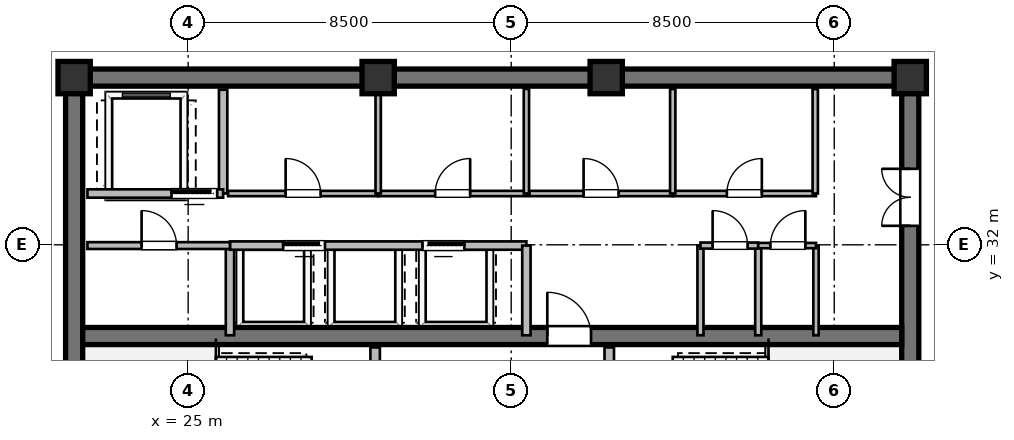
"""IFC4 building model, lengths in metres.
Left out: names, types, materials, properties, quantities, classifications, styles, units other than length and angle.
Written with IfcOpenShell. Run it as: python <this file> out.ifc"""

import sys

from ifc_helpers import new_model, si_unit, direction, frame, frame_2d, origin, origin_2d, place, context, subcontext, project, spatial, rectangle, extrude, element, fill, save


model = new_model("IFC4")
c1 = context("Model", 3, precision=1e-05, world=origin(), true_north=direction((0.0, 1.0)))
c2 = subcontext(c1, "Body", "Model", "MODEL_VIEW")
j1 = project(units=[si_unit("LENGTHUNIT", "METRE"), si_unit("PLANEANGLEUNIT", "RADIAN")], contexts=[c1])
p1 = place(None, origin())
s1 = spatial("IfcSite", under=j1, at=p1, CompositionType="ELEMENT")
p2 = place(p1, origin())
s2 = spatial("IfcBuilding", under=s1, at=p2, CompositionType="ELEMENT")
p3 = place(p2, frame((0.0, 0.0, 249.6)))
s3 = spatial("IfcBuildingStorey", under=s2, at=p3, CompositionType="ELEMENT", Elevation=249.6)
p4 = place(p3, frame((21.775, 36.4, 0.0), z_axis=(0.0, 0.0, 1.0), x_axis=(1.0, 0.0, 0.0)))
e1 = element("IfcWall", 1, at=p4, inside=s3, PredefinedType="SHEAR", context=c2, shape_type="SweptSolid", body=[
    extrude(rectangle(XDim=22.45, YDim=0.45, at=frame_2d((11.225, 0.0))), origin(), (0.0, 0.0, 1.0), 3.28),
])
p5 = place(p3, frame((22.0, 23.825, 0.0), z_axis=(0.0, 0.0, 1.0), x_axis=(0.0, 1.0, 0.0)))
e2 = element("IfcWall", 2, at=p5, inside=s3, PredefinedType="SHEAR", context=c2, shape_type="SweptSolid", body=[
    extrude(rectangle(XDim=12.35, YDim=0.45, at=frame_2d((6.175, 0.0))), origin(), (0.0, 0.0, 1.0), 3.28),
])
p6 = place(p3, frame((44.0, 23.825, 0.0), z_axis=(0.0, 0.0, 1.0), x_axis=(0.0, 1.0, 0.0)))
e3 = element("IfcWall", 3, at=p6, inside=s3, PredefinedType="SHEAR", context=c2, shape_type="SweptSolid", body=[
    extrude(rectangle(XDim=12.35, YDim=0.45, at=frame_2d((6.175, 0.0))), origin(), (0.0, 0.0, 1.0), 3.28),
])
p7 = place(p6, frame((8.675, 0.0, 0.0)))
e4 = element("IfcOpeningElement", 4, at=p7, cuts=e3, PredefinedType="OPENING", context=c2, shape_type="SweptSolid", body=[
    extrude(rectangle(XDim=1.5, YDim=2.15, at=frame_2d((0.75, 1.075))), frame((0.0, 0.235, 0.0), z_axis=(0.0, -1.0, 0.0), x_axis=(1.0, 0.0, 0.0)), (0.0, 0.0, 1.0), 0.47),
])
p8 = place(p3, frame((22.225, 29.6, 0.0), z_axis=(0.0, 0.0, 1.0), x_axis=(1.0, 0.0, 0.0)))
e5 = element("IfcWall", 5, at=p8, inside=s3, PredefinedType="SHEAR", context=c2, shape_type="SweptSolid", body=[
    extrude(rectangle(XDim=21.55, YDim=0.45, at=frame_2d((10.775, 0.0))), origin(), (0.0, 0.0, 1.0), 3.28),
])
p9 = place(p8, frame((12.225, 0.0, 0.0)))
e6 = element("IfcOpeningElement", 6, at=p9, cuts=e5, PredefinedType="OPENING", context=c2, shape_type="SweptSolid", body=[
    extrude(rectangle(XDim=1.15, YDim=2.1, at=frame_2d((0.575, 1.05))), frame((0.0, 0.235, 0.0), z_axis=(0.0, -1.0, 0.0), x_axis=(1.0, 0.0, 0.0)), (0.0, 0.0, 1.0), 0.47),
])
for number, where, z_axis, x_axis in (
    (7, (44.0, 36.4, 0.0), (0.0, 0.0, 1.0), (1.0, 0.0, 0.0)),
    (8, (36.0, 36.4, 0.0), (0.0, 0.0, 1.0), (1.0, 0.0, 0.0)),
    (9, (30.0, 36.4, 0.0), (0.0, 0.0, 1.0), (1.0, 0.0, 0.0)),
    (10, (22.0, 36.4, 0.0), (0.0, 0.0, 1.0), (1.0, 0.0, 0.0)),
):
    element("IfcColumn", number, at=place(p3, frame(where, z_axis=z_axis, x_axis=x_axis)), inside=s3, PredefinedType="COLUMN", context=c2, shape_type="SweptSolid", body=[
        extrude(rectangle(XDim=0.85, YDim=0.85, at=origin_2d()), origin(), (0.0, 0.0, 1.0), 3.6),
    ])
p10 = place(p3, frame((29.92, 23.9, 0.0), z_axis=(0.0, 0.0, 1.0), x_axis=(0.0, 1.0, 0.0)))
e11 = element("IfcWall", 11, at=p10, inside=s3, PredefinedType="SOLIDWALL", context=c2, shape_type="SweptSolid", body=[
    extrude(rectangle(XDim=5.4, YDim=0.25, at=frame_2d((2.7, 0.0))), origin(), (0.0, 0.0, 1.0), 3.28),
])
p11 = place(p10, frame((3.421, 0.0, 0.0)))
e12 = element("IfcOpeningElement", 12, at=p11, cuts=e11, PredefinedType="OPENING", context=c2, shape_type="SweptSolid", body=[
    extrude(rectangle(XDim=1.15, YDim=2.1, at=frame_2d((0.575, 1.05))), frame((0.0, 0.135, 0.0), z_axis=(0.0, -1.0, 0.0), x_axis=(1.0, 0.0, 0.0)), (0.0, 0.0, 1.0), 0.27),
])
p12 = place(p3, frame((36.08, 23.9, 0.0), z_axis=(0.0, 0.0, 1.0), x_axis=(0.0, 1.0, 0.0)))
e13 = element("IfcWall", 13, at=p12, inside=s3, PredefinedType="SOLIDWALL", context=c2, shape_type="SweptSolid", body=[
    extrude(rectangle(XDim=5.4, YDim=0.25, at=frame_2d((2.7, 0.0))), origin(), (0.0, 0.0, 1.0), 3.28),
])
p13 = place(p12, frame((3.421, 0.0, 0.0)))
e14 = element("IfcOpeningElement", 14, at=p13, cuts=e13, PredefinedType="OPENING", context=c2, shape_type="SweptSolid", body=[
    extrude(rectangle(XDim=1.15, YDim=2.1, at=frame_2d((0.575, 1.05))), frame((0.0, 0.135, 0.0), z_axis=(0.0, -1.0, 0.0), x_axis=(1.0, 0.0, 0.0)), (0.0, 0.0, 1.0), 0.27),
])
p14 = place(p3, frame((25.92, 33.35, 0.0), z_axis=(0.0, 0.0, 1.0), x_axis=(0.0, 1.0, 0.0)))
e15 = element("IfcWall", 15, at=p14, inside=s3, PredefinedType="SOLIDWALL", context=c2, shape_type="SweptSolid", body=[
    extrude(rectangle(XDim=2.73, YDim=0.22, at=frame_2d((1.365, 0.0))), origin(), (0.0, 0.0, 1.0), 3.28),
])
p15 = place(p3, frame((22.35, 33.35, 0.0), z_axis=(0.0, 0.0, 1.0), x_axis=(1.0, 0.0, 0.0)))
e16 = element("IfcWall", 16, at=p15, inside=s3, PredefinedType="SOLIDWALL", context=c2, shape_type="SweptSolid", body=[
    extrude(rectangle(XDim=3.57, YDim=0.22, at=frame_2d((1.785, 0.0))), origin(), (0.0, 0.0, 1.0), 3.28),
])
p16 = place(p15, frame((2.213, 0.0, 0.0)))
e17 = element("IfcOpeningElement", 17, at=p16, cuts=e16, PredefinedType="OPENING", context=c2, shape_type="SweptSolid", body=[
    extrude(rectangle(XDim=1.2, YDim=2.1, at=frame_2d((0.6, 1.05))), frame((0.0, 0.12, 0.0), z_axis=(0.0, -1.0, 0.0), x_axis=(1.0, 0.0, 0.0)), (0.0, 0.0, 1.0), 0.24),
])
p17 = place(p3, frame((26.1, 29.62, 0.0), z_axis=(0.0, 0.0, 1.0), x_axis=(0.0, 1.0, 0.0)))
e18 = element("IfcWall", 18, at=p17, inside=s3, PredefinedType="SOLIDWALL", context=c2, shape_type="SweptSolid", body=[
    extrude(rectangle(XDim=2.36, YDim=0.22, at=frame_2d((1.18, 0.0))), origin(), (0.0, 0.0, 1.0), 3.28),
])
p18 = place(p3, frame((26.1, 31.98, 0.0), z_axis=(0.0, 0.0, 1.0), x_axis=(1.0, 0.0, 0.0)))
e19 = element("IfcWall", 19, at=p18, inside=s3, PredefinedType="SOLIDWALL", context=c2, shape_type="SweptSolid", body=[
    extrude(rectangle(XDim=7.8, YDim=0.22, at=frame_2d((3.9, 0.0))), origin(), (0.0, 0.0, 1.0), 3.28),
])
p19 = place(p18, frame((1.4, 0.0, 0.0)))
e20 = element("IfcOpeningElement", 20, at=p19, cuts=e19, PredefinedType="OPENING", context=c2, shape_type="SweptSolid", body=[
    extrude(rectangle(XDim=1.1, YDim=2.1, at=frame_2d((0.55, 1.05))), frame((0.0, 0.12, 0.0), z_axis=(0.0, -1.0, 0.0), x_axis=(1.0, 0.0, 0.0)), (0.0, 0.0, 1.0), 0.24),
])
p20 = place(p18, frame((5.066, 0.0, 0.0)))
e21 = element("IfcOpeningElement", 21, at=p20, cuts=e19, PredefinedType="OPENING", context=c2, shape_type="SweptSolid", body=[
    extrude(rectangle(XDim=1.1, YDim=2.1, at=frame_2d((0.55, 1.05))), frame((0.0, 0.12, 0.0), z_axis=(0.0, -1.0, 0.0), x_axis=(1.0, 0.0, 0.0)), (0.0, 0.0, 1.0), 0.24),
])
p21 = place(p3, frame((33.9, 29.62, 0.0), z_axis=(0.0, 0.0, 1.0), x_axis=(0.0, 1.0, 0.0)))
e22 = element("IfcWall", 22, at=p21, inside=s3, PredefinedType="SOLIDWALL", context=c2, shape_type="SweptSolid", body=[
    extrude(rectangle(XDim=2.36, YDim=0.22, at=frame_2d((1.18, 0.0))), origin(), (0.0, 0.0, 1.0), 3.28),
])
p22 = place(p3, frame((26.05, 33.35, 0.0), z_axis=(0.0, 0.0, 1.0), x_axis=(1.0, 0.0, 0.0)))
e23 = element("IfcWall", 23, at=p22, inside=s3, PredefinedType="PARTITIONING", context=c2, shape_type="SweptSolid", body=[
    extrude(rectangle(XDim=3.95, YDim=0.14, at=frame_2d((1.975, 0.0))), origin(), (0.0, 0.0, 1.0), 3.28),
])
p23 = place(p22, frame((1.515, 0.0, 0.0)))
e24 = element("IfcOpeningElement", 24, at=p23, cuts=e23, PredefinedType="OPENING", context=c2, shape_type="SweptSolid", body=[
    extrude(rectangle(XDim=0.92, YDim=2.1, at=frame_2d((0.46, 1.05))), frame((0.0, 0.08, 0.0), z_axis=(0.0, -1.0, 0.0), x_axis=(1.0, 0.0, 0.0)), (0.0, 0.0, 1.0), 0.16),
])
p24 = place(p3, frame((30.0, 33.35, 0.0), z_axis=(0.0, 0.0, 1.0), x_axis=(1.0, 0.0, 0.0)))
e25 = element("IfcWall", 25, at=p24, inside=s3, PredefinedType="PARTITIONING", context=c2, shape_type="SweptSolid", body=[
    extrude(rectangle(XDim=3.92, YDim=0.14, at=frame_2d((1.96, 0.0))), origin(), (0.0, 0.0, 1.0), 3.28),
])
p25 = place(p24, frame((1.5, 0.0, 0.0)))
e26 = element("IfcOpeningElement", 26, at=p25, cuts=e25, PredefinedType="OPENING", context=c2, shape_type="SweptSolid", body=[
    extrude(rectangle(XDim=0.92, YDim=2.1, at=frame_2d((0.46, 1.05))), frame((0.0, 0.08, 0.0), z_axis=(0.0, -1.0, 0.0), x_axis=(1.0, 0.0, 0.0)), (0.0, 0.0, 1.0), 0.16),
])
for number, where, z_axis, x_axis in (
    (27, (30.0, 33.35, 0.0), (0.0, 0.0, 1.0), (0.0, 1.0, 0.0)),
    (28, (33.9, 33.35, 0.0), (0.0, 0.0, 1.0), (0.0, 1.0, 0.0)),
):
    element("IfcWall", number, at=place(p3, frame(where, z_axis=z_axis, x_axis=x_axis)), inside=s3, PredefinedType="PARTITIONING", context=c2, shape_type="SweptSolid", body=[
        extrude(rectangle(XDim=2.75, YDim=0.14, at=frame_2d((1.375, 0.0))), origin(), (0.0, 0.0, 1.0), 3.28),
    ])
p26 = place(p3, frame((33.98, 33.35, 0.0), z_axis=(0.0, 0.0, 1.0), x_axis=(1.0, 0.0, 0.0)))
e29 = element("IfcWall", 29, at=p26, inside=s3, PredefinedType="PARTITIONING", context=c2, shape_type="SweptSolid", body=[
    extrude(rectangle(XDim=3.77, YDim=0.14, at=frame_2d((1.885, 0.0))), origin(), (0.0, 0.0, 1.0), 3.28),
])
p27 = place(p26, frame((1.425, 0.0, 0.0)))
e30 = element("IfcOpeningElement", 30, at=p27, cuts=e29, PredefinedType="OPENING", context=c2, shape_type="SweptSolid", body=[
    extrude(rectangle(XDim=0.92, YDim=2.1, at=frame_2d((0.46, 1.05))), frame((0.0, 0.08, 0.0), z_axis=(0.0, -1.0, 0.0), x_axis=(1.0, 0.0, 0.0)), (0.0, 0.0, 1.0), 0.16),
])
p28 = place(p3, frame((37.75, 33.35, 0.0), z_axis=(0.0, 0.0, 1.0), x_axis=(1.0, 0.0, 0.0)))
e31 = element("IfcWall", 31, at=p28, inside=s3, PredefinedType="PARTITIONING", context=c2, shape_type="SweptSolid", body=[
    extrude(rectangle(XDim=3.77, YDim=0.14, at=frame_2d((1.885, 0.0))), origin(), (0.0, 0.0, 1.0), 3.28),
])
p29 = place(p28, frame((1.425, 0.0, 0.0)))
e32 = element("IfcOpeningElement", 32, at=p29, cuts=e31, PredefinedType="OPENING", context=c2, shape_type="SweptSolid", body=[
    extrude(rectangle(XDim=0.92, YDim=2.1, at=frame_2d((0.46, 1.05))), frame((0.0, 0.08, 0.0), z_axis=(0.0, -1.0, 0.0), x_axis=(1.0, 0.0, 0.0)), (0.0, 0.0, 1.0), 0.16),
])
for number, where, z_axis, x_axis in (
    (33, (37.75, 33.35, 0.0), (0.0, 0.0, 1.0), (0.0, 1.0, 0.0)),
    (34, (41.5, 33.35, 0.0), (0.0, 0.0, 1.0), (0.0, 1.0, 0.0)),
):
    element("IfcWall", number, at=place(p3, frame(where, z_axis=z_axis, x_axis=x_axis)), inside=s3, PredefinedType="PARTITIONING", context=c2, shape_type="SweptSolid", body=[
        extrude(rectangle(XDim=2.75, YDim=0.14, at=frame_2d((1.375, 0.0))), origin(), (0.0, 0.0, 1.0), 3.28),
    ])
p30 = place(p3, frame((22.35, 31.98, 0.0), z_axis=(0.0, 0.0, 1.0), x_axis=(1.0, 0.0, 0.0)))
e35 = element("IfcWall", 35, at=p30, inside=s3, PredefinedType="PARTITIONING", context=c2, shape_type="SweptSolid", body=[
    extrude(rectangle(XDim=3.75, YDim=0.18, at=frame_2d((1.875, 0.0))), origin(), (0.0, 0.0, 1.0), 3.28),
])
p31 = place(p30, frame((1.425, 0.0, 0.0)))
e36 = element("IfcOpeningElement", 36, at=p31, cuts=e35, PredefinedType="OPENING", context=c2, shape_type="SweptSolid", body=[
    extrude(rectangle(XDim=0.92, YDim=2.1, at=frame_2d((0.46, 1.05))), frame((0.0, 0.1, 0.0), z_axis=(0.0, -1.0, 0.0), x_axis=(1.0, 0.0, 0.0)), (0.0, 0.0, 1.0), 0.2),
])
for number, where, z_axis, x_axis in (
    (37, (38.48, 29.62, 0.0), (0.0, 0.0, 1.0), (0.0, 1.0, 0.0)),
    (38, (40.0, 29.62, 0.0), (0.0, 0.0, 1.0), (0.0, 1.0, 0.0)),
):
    element("IfcWall", number, at=place(p3, frame(where, z_axis=z_axis, x_axis=x_axis)), inside=s3, PredefinedType="PLUMBINGWALL", context=c2, shape_type="SweptSolid", body=[
        extrude(rectangle(XDim=2.36, YDim=0.16, at=frame_2d((1.18, 0.0))), origin(), (0.0, 0.0, 1.0), 3.28),
    ])
p32 = place(p3, frame((41.52, 29.62, 0.0), z_axis=(0.0, 0.0, 1.0), x_axis=(0.0, 1.0, 0.0)))
e39 = element("IfcWall", 39, at=p32, inside=s3, PredefinedType="PARTITIONING", context=c2, shape_type="SweptSolid", body=[
    extrude(rectangle(XDim=2.36, YDim=0.14, at=frame_2d((1.18, 0.0))), origin(), (0.0, 0.0, 1.0), 3.28),
])
p33 = place(p3, frame((38.48, 31.98, 0.0), z_axis=(0.0, 0.0, 1.0), x_axis=(1.0, 0.0, 0.0)))
e40 = element("IfcWall", 40, at=p33, inside=s3, PredefinedType="PLUMBINGWALL", context=c2, shape_type="SweptSolid", body=[
    extrude(rectangle(XDim=1.52, YDim=0.16, at=frame_2d((0.76, 0.0))), origin(), (0.0, 0.0, 1.0), 3.28),
])
p34 = place(p33, frame((0.32, 0.0, 0.0)))
e41 = element("IfcOpeningElement", 41, at=p34, cuts=e40, PredefinedType="OPENING", context=c2, shape_type="SweptSolid", body=[
    extrude(rectangle(XDim=0.92, YDim=2.1, at=frame_2d((0.46, 1.05))), frame((0.0, 0.09, 0.0), z_axis=(0.0, -1.0, 0.0), x_axis=(1.0, 0.0, 0.0)), (0.0, 0.0, 1.0), 0.18),
])
p35 = place(p3, frame((40.0, 31.98, 0.0), z_axis=(0.0, 0.0, 1.0), x_axis=(1.0, 0.0, 0.0)))
e42 = element("IfcWall", 42, at=p35, inside=s3, PredefinedType="PARTITIONING", context=c2, shape_type="SweptSolid", body=[
    extrude(rectangle(XDim=1.52, YDim=0.14, at=frame_2d((0.76, 0.0))), origin(), (0.0, 0.0, 1.0), 3.28),
])
p36 = place(p35, frame((0.32, 0.0, 0.0)))
e43 = element("IfcOpeningElement", 43, at=p36, cuts=e42, PredefinedType="OPENING", context=c2, shape_type="SweptSolid", body=[
    extrude(rectangle(XDim=0.92, YDim=2.1, at=frame_2d((0.46, 1.05))), frame((0.0, 0.08, 0.0), z_axis=(0.0, -1.0, 0.0), x_axis=(1.0, 0.0, 0.0)), (0.0, 0.0, 1.0), 0.16),
])
p37 = place(p9, origin())
e44 = element("IfcDoor", 44, at=p37, inside=s3, OperationType="SINGLE_SWING_LEFT", PredefinedType="DOOR", context=c2, shape_type="SweptSolid", body=[
    extrude(rectangle(XDim=1.15, YDim=2.1, at=frame_2d((0.575, 1.05))), frame((0.0, 0.025, 0.0), z_axis=(0.0, -1.0, 0.0), x_axis=(1.0, 0.0, 0.0)), (0.0, 0.0, 1.0), 0.05),
])
fill(e6, e44)
p38 = place(p7, origin())
e45 = element("IfcDoor", 45, at=p38, inside=s3, OperationType="DOUBLE_DOOR_SINGLE_SWING", PredefinedType="DOOR", context=c2, shape_type="SweptSolid", body=[
    extrude(rectangle(XDim=1.5, YDim=2.15, at=frame_2d((0.75, 1.075))), frame((0.0, 0.025, 0.0), z_axis=(0.0, -1.0, 0.0), x_axis=(1.0, 0.0, 0.0)), (0.0, 0.0, 1.0), 0.05),
])
fill(e4, e45)
p39 = place(p16, origin())
e46 = element("IfcDoor", 46, at=p39, inside=s3, OperationType="SLIDING_TO_LEFT", PredefinedType="DOOR", context=c2, shape_type="SweptSolid", body=[
    extrude(rectangle(XDim=1.2, YDim=2.1, at=frame_2d((0.6, 1.05))), frame((0.0, 0.025, 0.0), z_axis=(0.0, -1.0, 0.0), x_axis=(1.0, 0.0, 0.0)), (0.0, 0.0, 1.0), 0.05),
])
fill(e17, e46)
p40 = place(p19, origin())
e47 = element("IfcDoor", 47, at=p40, inside=s3, OperationType="SLIDING_TO_LEFT", PredefinedType="DOOR", context=c2, shape_type="SweptSolid", body=[
    extrude(rectangle(XDim=1.1, YDim=2.1, at=frame_2d((0.55, 1.05))), frame((0.0, 0.025, 0.0), z_axis=(0.0, -1.0, 0.0), x_axis=(1.0, 0.0, 0.0)), (0.0, 0.0, 1.0), 0.05),
])
fill(e20, e47)
p41 = place(p20, origin())
e48 = element("IfcDoor", 48, at=p41, inside=s3, OperationType="SLIDING_TO_RIGHT", PredefinedType="DOOR", context=c2, shape_type="SweptSolid", body=[
    extrude(rectangle(XDim=1.1, YDim=2.1, at=frame_2d((0.55, 1.05))), frame((0.0, 0.025, 0.0), z_axis=(0.0, -1.0, 0.0), x_axis=(1.0, 0.0, 0.0)), (0.0, 0.0, 1.0), 0.05),
])
fill(e21, e48)
p42 = place(p23, origin())
e49 = element("IfcDoor", 49, at=p42, inside=s3, OperationType="SINGLE_SWING_LEFT", PredefinedType="DOOR", context=c2, shape_type="SweptSolid", body=[
    extrude(rectangle(XDim=0.92, YDim=2.1, at=frame_2d((0.46, 1.05))), frame((0.0, 0.025, 0.0), z_axis=(0.0, -1.0, 0.0), x_axis=(1.0, 0.0, 0.0)), (0.0, 0.0, 1.0), 0.05),
])
fill(e24, e49)
p43 = place(p25, origin())
e50 = element("IfcDoor", 50, at=p43, inside=s3, OperationType="SINGLE_SWING_RIGHT", PredefinedType="DOOR", context=c2, shape_type="SweptSolid", body=[
    extrude(rectangle(XDim=0.92, YDim=2.1, at=frame_2d((0.46, 1.05))), frame((0.0, 0.025, 0.0), z_axis=(0.0, -1.0, 0.0), x_axis=(1.0, 0.0, 0.0)), (0.0, 0.0, 1.0), 0.05),
])
fill(e26, e50)
p44 = place(p27, origin())
e51 = element("IfcDoor", 51, at=p44, inside=s3, OperationType="SINGLE_SWING_LEFT", PredefinedType="DOOR", context=c2, shape_type="SweptSolid", body=[
    extrude(rectangle(XDim=0.92, YDim=2.1, at=frame_2d((0.46, 1.05))), frame((0.0, 0.025, 0.0), z_axis=(0.0, -1.0, 0.0), x_axis=(1.0, 0.0, 0.0)), (0.0, 0.0, 1.0), 0.05),
])
fill(e30, e51)
p45 = place(p29, origin())
e52 = element("IfcDoor", 52, at=p45, inside=s3, OperationType="SINGLE_SWING_RIGHT", PredefinedType="DOOR", context=c2, shape_type="SweptSolid", body=[
    extrude(rectangle(XDim=0.92, YDim=2.1, at=frame_2d((0.46, 1.05))), frame((0.0, 0.025, 0.0), z_axis=(0.0, -1.0, 0.0), x_axis=(1.0, 0.0, 0.0)), (0.0, 0.0, 1.0), 0.05),
])
fill(e32, e52)
p46 = place(p31, origin())
e53 = element("IfcDoor", 53, at=p46, inside=s3, OperationType="SINGLE_SWING_LEFT", PredefinedType="DOOR", context=c2, shape_type="SweptSolid", body=[
    extrude(rectangle(XDim=0.92, YDim=2.1, at=frame_2d((0.46, 1.05))), frame((0.0, 0.025, 0.0), z_axis=(0.0, -1.0, 0.0), x_axis=(1.0, 0.0, 0.0)), (0.0, 0.0, 1.0), 0.05),
])
fill(e36, e53)
p47 = place(p34, origin())
e54 = element("IfcDoor", 54, at=p47, inside=s3, OperationType="SINGLE_SWING_LEFT", PredefinedType="DOOR", context=c2, shape_type="SweptSolid", body=[
    extrude(rectangle(XDim=0.92, YDim=2.1, at=frame_2d((0.46, 1.05))), frame((0.0, 0.025, 0.0), z_axis=(0.0, -1.0, 0.0), x_axis=(1.0, 0.0, 0.0)), (0.0, 0.0, 1.0), 0.05),
])
fill(e41, e54)
p48 = place(p36, origin())
e55 = element("IfcDoor", 55, at=p48, inside=s3, OperationType="SINGLE_SWING_RIGHT", PredefinedType="DOOR", context=c2, shape_type="SweptSolid", body=[
    extrude(rectangle(XDim=0.92, YDim=2.1, at=frame_2d((0.46, 1.05))), frame((0.0, 0.025, 0.0), z_axis=(0.0, -1.0, 0.0), x_axis=(1.0, 0.0, 0.0)), (0.0, 0.0, 1.0), 0.05),
])
fill(e43, e55)
save(model, sys.argv[1])
